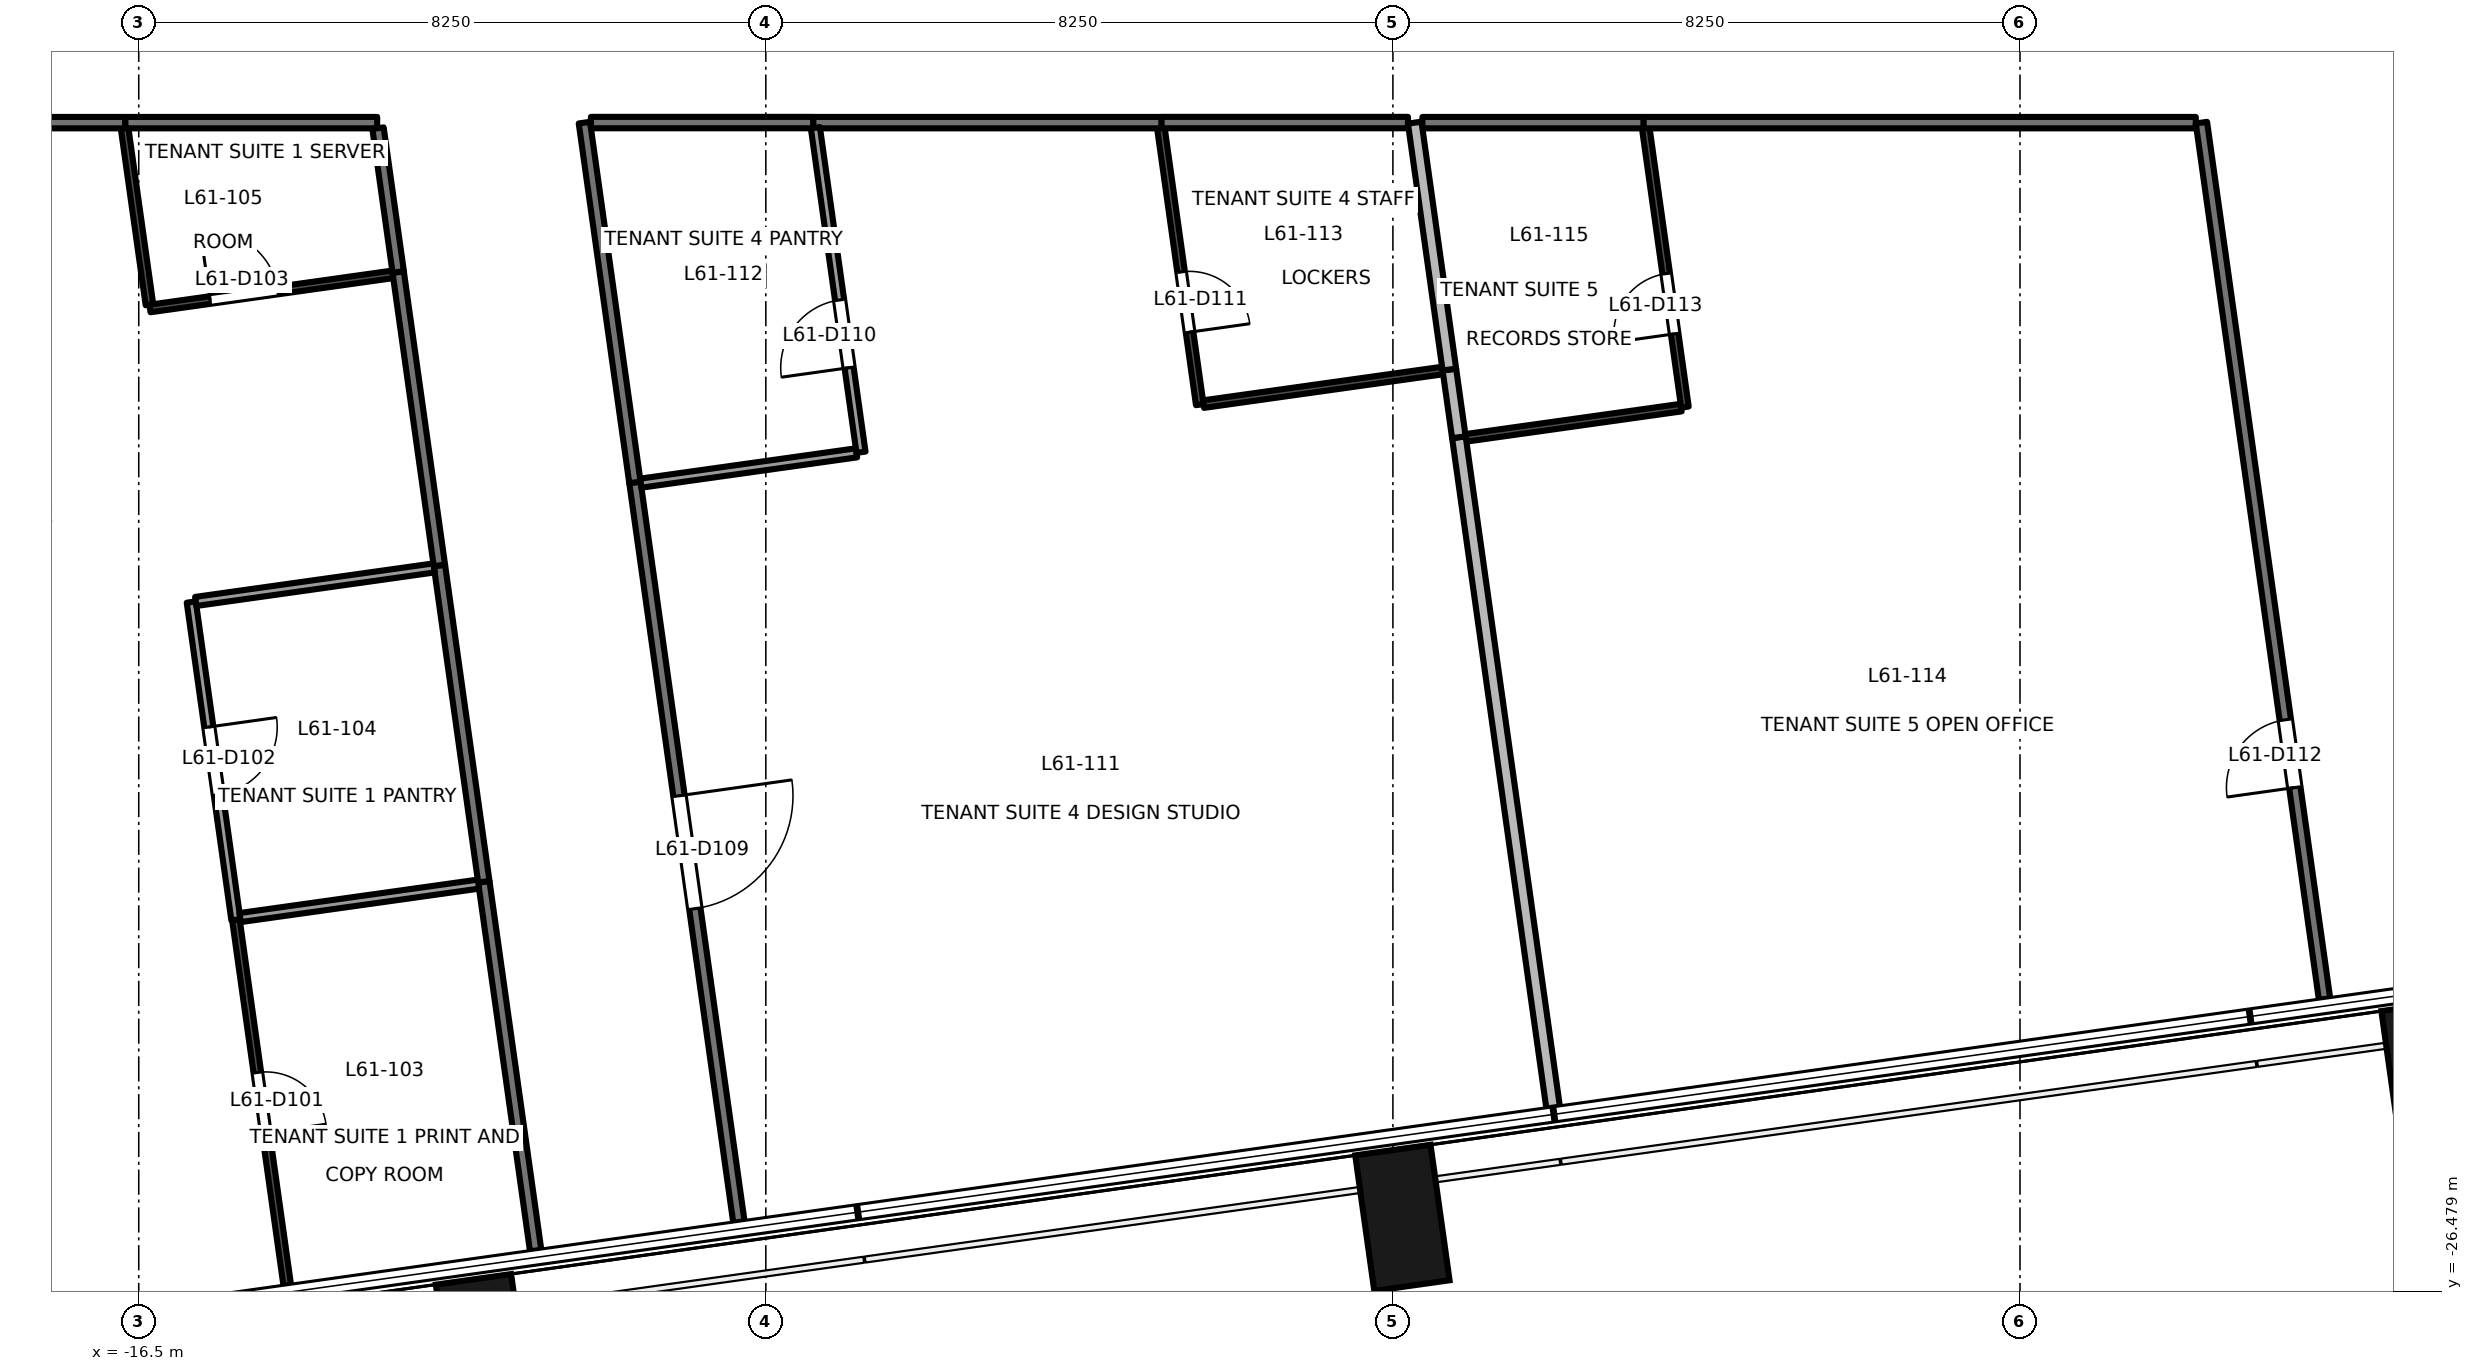
"""IFC4 building model, lengths in metres.
Left out: names, types, materials, properties, quantities, classifications, styles, units other than length and angle.
Written with IfcOpenShell. Run it as: python <this file> out.ifc"""

import sys

from ifc_helpers import new_model, si_unit, direction, frame, frame_2d, origin, origin_2d, place, context, subcontext, project, spatial, rectangle, extrude, element, fill, save


model = new_model("IFC4")
c1 = context("Model", 3, precision=1e-05, world=origin(), true_north=direction((0.0, 1.0)))
c2 = subcontext(c1, "Body", "Model", "MODEL_VIEW")
j1 = project(units=[si_unit("LENGTHUNIT", "METRE"), si_unit("PLANEANGLEUNIT", "RADIAN")], contexts=[c1])
p1 = place(None, origin())
s1 = spatial("IfcSite", under=j1, at=p1, CompositionType="ELEMENT")
p2 = place(p1, origin())
s2 = spatial("IfcBuilding", under=s1, at=p2, CompositionType="ELEMENT")
p3 = place(p2, frame((0.0, 0.0, 266.8)))
s3 = spatial("IfcBuildingStorey", under=s2, at=p3, CompositionType="ELEMENT", Elevation=266.8)
for number, where, z_axis, x_axis in (
    (1, (-11.971, -27.209, -0.2), (0.0, 0.0, 1.0), (0.99, 0.139, 0.0)),
    (2, (0.125, -25.508, -0.2), (0.0, 0.0, 1.0), (0.99, 0.139, 0.0)),
    (3, (13.625, -23.61, -0.2), (0.0, 0.0, 1.0), (0.99, 0.139, 0.0)),
):
    element("IfcColumn", number, at=place(p3, frame(where, z_axis=z_axis, x_axis=x_axis)), inside=s3, PredefinedType="COLUMN", context=c2, shape_type="SweptSolid", body=[
        extrude(rectangle(XDim=1.0, YDim=1.8, at=origin_2d()), origin(), (0.0, 0.0, 1.0), 3.9),
    ])
p4 = place(p3, frame((-16.676, -11.1, 0.0), z_axis=(0.0, 0.0, 1.0), x_axis=(-1.0, 0.0, 0.0)))
e4 = element("IfcWall", 4, at=p4, inside=s3, PredefinedType="PARTITIONING", context=c2, shape_type="SweptSolid", body=[
    extrude(rectangle(XDim=4.024, YDim=0.15, at=frame_2d((2.012, 0.0))), origin(), (0.0, 0.0, 1.0), 3.7),
])
p5 = place(p4, frame((1.562, 0.0, 0.0)))
e5 = element("IfcOpeningElement", 5, at=p5, cuts=e4, PredefinedType="OPENING", context=c2, shape_type="SweptSolid", body=[
    extrude(rectangle(XDim=0.9, YDim=2.1, at=frame_2d((0.45, 1.05))), frame((0.0, 0.085, 0.0), z_axis=(0.0, -1.0, 0.0), x_axis=(1.0, 0.0, 0.0)), (0.0, 0.0, 1.0), 0.171),
])
p6 = place(p3, frame((-12.544, -16.928, 0.0), z_axis=(0.0, 0.0, 1.0), x_axis=(-0.139221261089, 0.990261299083, 0.0)))
e6 = element("IfcWall", 6, at=p6, inside=s3, PredefinedType="PARTITIONING", context=c2, shape_type="SweptSolid", body=[
    extrude(rectangle(XDim=3.9, YDim=0.15, at=frame_2d((1.95, 0.0))), origin(), (0.0, 0.0, 1.0), 3.7),
])
p7 = place(p3, frame((-11.278, -25.939, 0.0), z_axis=(0.0, 0.0, 1.0), x_axis=(-0.139167797017, 0.990268814148, 0.0)))
e7 = element("IfcWall", 7, at=p7, inside=s3, PredefinedType="PARTITIONING", context=c2, shape_type="SweptSolid", body=[
    extrude(rectangle(XDim=4.9, YDim=0.15, at=frame_2d((2.45, 0.0))), origin(), (0.0, 0.0, 1.0), 3.7),
])
p8 = place(p3, frame((-11.96, -21.087, 0.0), z_axis=(0.0, 0.0, 1.0), x_axis=(-0.139052638616, 0.990284991148, 0.0)))
e8 = element("IfcWall", 8, at=p8, inside=s3, PredefinedType="PARTITIONING", context=c2, shape_type="SweptSolid", body=[
    extrude(rectangle(XDim=4.2, YDim=0.15, at=frame_2d((2.1, 0.0))), origin(), (0.0, 0.0, 1.0), 3.7),
])
p9 = place(p3, frame((-13.363, -11.1, 0.0), z_axis=(0.0, 0.0, 1.0), x_axis=(-1.0, 0.0, 0.0)))
e9 = element("IfcWall", 9, at=p9, inside=s3, PredefinedType="PARTITIONING", context=c2, shape_type="SweptSolid", body=[
    extrude(rectangle(XDim=3.313, YDim=0.15, at=frame_2d((1.656, 0.0))), origin(), (0.0, 0.0, 1.0), 2.8),
])
p10 = place(p3, frame((-13.086, -13.065, 0.0), z_axis=(0.0, 0.0, 1.0), x_axis=(-0.139292033523, 0.990251346577, 0.0)))
e10 = element("IfcWall", 10, at=p10, inside=s3, PredefinedType="PARTITIONING", context=c2, shape_type="SweptSolid", body=[
    extrude(rectangle(XDim=1.91, YDim=0.15, at=frame_2d((0.955, 0.0))), origin(), (0.0, 0.0, 1.0), 2.8),
])
p11 = place(p3, frame((-9.972, -15.833, 0.0), z_axis=(0.0, 0.0, 1.0), x_axis=(0.139205343882, -0.990263536759, 0.0)))
e11 = element("IfcWall", 11, at=p11, inside=s3, PredefinedType="PARTITIONING", context=c2, shape_type="SweptSolid", body=[
    extrude(rectangle(XDim=9.827, YDim=0.15, at=frame_2d((4.913, 0.0))), origin(), (0.0, 0.0, 1.0), 2.8),
])
p12 = place(p11, frame((4.163, 0.0, 0.0)))
e12 = element("IfcOpeningElement", 12, at=p12, cuts=e11, PredefinedType="OPENING", context=c2, shape_type="SweptSolid", body=[
    extrude(rectangle(XDim=1.5, YDim=2.1, at=frame_2d((0.75, 1.05))), frame((0.0, 0.085, 0.0), z_axis=(0.0, -1.0, 0.0), x_axis=(1.0, 0.0, 0.0)), (0.0, 0.0, 1.0), 0.171),
])
p13 = place(p3, frame((-3.043, -11.1, 0.0), z_axis=(0.0, 0.0, 1.0), x_axis=(-1.0, 0.0, 0.0)))
e13 = element("IfcWall", 13, at=p13, inside=s3, PredefinedType="PARTITIONING", context=c2, shape_type="SweptSolid", body=[
    extrude(rectangle(XDim=4.584, YDim=0.15, at=frame_2d((2.292, 0.0))), origin(), (0.0, 0.0, 1.0), 2.8),
])
p14 = place(p3, frame((-10.637, -11.1, 0.0), z_axis=(0.0, 0.0, 1.0), x_axis=(0.139146821365, -0.990271761742, 0.0)))
e14 = element("IfcWall", 14, at=p14, inside=s3, PredefinedType="PARTITIONING", context=c2, shape_type="SweptSolid", body=[
    extrude(rectangle(XDim=4.779, YDim=0.15, at=frame_2d((2.39, 0.0))), origin(), (0.0, 0.0, 1.0), 3.7),
])
p15 = place(p3, frame((-7.627, -11.099, 0.0), z_axis=(0.0, 0.0, 1.0), x_axis=(-1.0, 0.0, 0.0)))
e15 = element("IfcWall", 15, at=p15, inside=s3, PredefinedType="PARTITIONING", context=c2, shape_type="SweptSolid", body=[
    extrude(rectangle(XDim=2.924, YDim=0.15, at=frame_2d((1.462, 0.0))), origin(), (0.0, 0.0, 1.0), 2.8),
])
p16 = place(p3, frame((0.198, -11.099, 0.0), z_axis=(0.0, 0.0, 1.0), x_axis=(-1.0, 0.0, 0.0)))
e16 = element("IfcWall", 16, at=p16, inside=s3, PredefinedType="PARTITIONING", context=c2, shape_type="SweptSolid", body=[
    extrude(rectangle(XDim=3.241, YDim=0.15, at=frame_2d((1.621, 0.0))), origin(), (0.0, 0.0, 1.0), 2.9),
])
p17 = place(p3, frame((10.563, -11.1, 0.0), z_axis=(0.0, 0.0, 1.0), x_axis=(-1.0, 0.0, 0.0)))
e17 = element("IfcWall", 17, at=p17, inside=s3, PredefinedType="PARTITIONING", context=c2, shape_type="SweptSolid", body=[
    extrude(rectangle(XDim=7.267, YDim=0.15, at=frame_2d((3.634, 0.0))), origin(), (0.0, 0.0, 1.0), 2.9),
])
p18 = place(p3, frame((12.257, -22.631, 0.0), z_axis=(0.0, 0.0, 1.0), x_axis=(-0.139134361512, 0.990273512443, 0.0)))
e18 = element("IfcWall", 18, at=p18, inside=s3, PredefinedType="PARTITIONING", context=c2, shape_type="SweptSolid", body=[
    extrude(rectangle(XDim=11.644, YDim=0.15, at=frame_2d((5.822, 0.0))), origin(), (0.0, 0.0, 1.0), 3.7),
])
p19 = place(p18, frame((2.811, 0.0, 0.0)))
e19 = element("IfcOpeningElement", 19, at=p19, cuts=e18, PredefinedType="OPENING", context=c2, shape_type="SweptSolid", body=[
    extrude(rectangle(XDim=0.9, YDim=2.1, at=frame_2d((0.45, 1.05))), frame((0.0, 0.085, 0.0), z_axis=(0.0, -1.0, 0.0), x_axis=(1.0, 0.0, 0.0)), (0.0, 0.0, 1.0), 0.171),
])
p20 = place(p3, frame((3.296, -11.1, 0.0), z_axis=(0.0, 0.0, 1.0), x_axis=(-1.0, 0.0, 0.0)))
e20 = element("IfcWall", 20, at=p20, inside=s3, PredefinedType="PARTITIONING", context=c2, shape_type="SweptSolid", body=[
    extrude(rectangle(XDim=2.908, YDim=0.15, at=frame_2d((1.454, 0.0))), origin(), (0.0, 0.0, 1.0), 3.7),
])
p21 = place(p3, frame((-15.222, -21.586, 0.0), z_axis=(0.0, 0.0, 1.0), x_axis=(0.139120882778, -0.990275406124, 0.0)))
e21 = element("IfcWall", 21, at=p21, inside=s3, PredefinedType="PARTITIONING", context=c2, shape_type="SweptSolid", body=[
    extrude(rectangle(XDim=4.859, YDim=0.1, at=frame_2d((2.43, 0.0))), origin(), (0.0, 0.0, 1.0), 3.7),
])
p22 = place(p21, frame((2.03, 0.0, 0.0)))
e22 = element("IfcOpeningElement", 22, at=p22, cuts=e21, PredefinedType="OPENING", context=c2, shape_type="SweptSolid", body=[
    extrude(rectangle(XDim=0.8, YDim=2.1, at=frame_2d((0.4, 1.05))), frame((0.0, 0.061, 0.0), z_axis=(0.0, -1.0, 0.0), x_axis=(1.0, 0.0, 0.0)), (0.0, 0.0, 1.0), 0.121),
])
p23 = place(p3, frame((-15.809, -17.407, 0.0), z_axis=(0.0, 0.0, 1.0), x_axis=(0.139136935655, -0.99027315077, 0.0)))
e23 = element("IfcWall", 23, at=p23, inside=s3, PredefinedType="PARTITIONING", context=c2, shape_type="SweptSolid", body=[
    extrude(rectangle(XDim=4.22, YDim=0.12, at=frame_2d((2.11, 0.0))), origin(), (0.0, 0.0, 1.0), 3.7),
])
p24 = place(p23, frame((1.66, 0.0, 0.0)))
e24 = element("IfcOpeningElement", 24, at=p24, cuts=e23, PredefinedType="OPENING", context=c2, shape_type="SweptSolid", body=[
    extrude(rectangle(XDim=0.9, YDim=2.1, at=frame_2d((0.45, 1.05))), frame((0.0, 0.071, 0.0), z_axis=(0.0, -1.0, 0.0), x_axis=(1.0, 0.0, 0.0)), (0.0, 0.0, 1.0), 0.141),
])
p25 = place(p3, frame((-12.615, -16.958, 0.0), z_axis=(0.0, 0.0, 1.0), x_axis=(-0.990254086283, -0.139272555084, 0.0)))
e25 = element("IfcWall", 25, at=p25, inside=s3, PredefinedType="PARTITIONING", context=c2, shape_type="SweptSolid", body=[
    extrude(rectangle(XDim=3.166, YDim=0.12, at=frame_2d((1.583, 0.0))), origin(), (0.0, 0.0, 1.0), 2.8),
])
p26 = place(p3, frame((-16.687, -11.168, 0.0), z_axis=(0.0, 0.0, 1.0), x_axis=(0.139560302367, -0.990213573934, 0.0)))
e26 = element("IfcWall", 26, at=p26, inside=s3, PredefinedType="PARTITIONING", context=c2, shape_type="SweptSolid", body=[
    extrude(rectangle(XDim=2.351, YDim=0.1, at=frame_2d((1.176, 0.0))), origin(), (0.0, 0.0, 1.0), 3.7),
])
p27 = place(p3, frame((-16.352, -13.545, 0.0), z_axis=(0.0, 0.0, 1.0), x_axis=(0.990264894561, 0.13919568456, 0.0)))
e27 = element("IfcWall", 27, at=p27, inside=s3, PredefinedType="PARTITIONING", context=c2, shape_type="SweptSolid", body=[
    extrude(rectangle(XDim=3.226, YDim=0.1, at=frame_2d((1.613, 0.0))), origin(), (0.0, 0.0, 1.0), 2.8),
])
p28 = place(p27, frame((0.798, 0.0, 0.0)))
e28 = element("IfcOpeningElement", 28, at=p28, cuts=e27, PredefinedType="OPENING", context=c2, shape_type="SweptSolid", body=[
    extrude(rectangle(XDim=0.9, YDim=2.1, at=frame_2d((0.45, 1.05))), frame((0.0, 0.061, 0.0), z_axis=(0.0, -1.0, 0.0), x_axis=(1.0, 0.0, 0.0)), (0.0, 0.0, 1.0), 0.121),
])
p29 = place(p3, frame((-15.166, -21.558, 0.0), z_axis=(0.0, 0.0, 1.0), x_axis=(0.990285967974, 0.139045681821, 0.0)))
e29 = element("IfcWall", 29, at=p29, inside=s3, PredefinedType="PARTITIONING", context=c2, shape_type="SweptSolid", body=[
    extrude(rectangle(XDim=3.166, YDim=0.12, at=frame_2d((1.583, 0.0))), origin(), (0.0, 0.0, 1.0), 2.8),
])
p30 = place(p3, frame((-9.895, -15.843, 0.0), z_axis=(0.0, 0.0, 1.0), x_axis=(0.990265570358, 0.139190876728, 0.0)))
e30 = element("IfcWall", 30, at=p30, inside=s3, PredefinedType="PARTITIONING", context=c2, shape_type="SweptSolid", body=[
    extrude(rectangle(XDim=2.866, YDim=0.12, at=frame_2d((1.433, 0.0))), origin(), (0.0, 0.0, 1.0), 2.8),
])
p31 = place(p3, frame((-6.998, -15.436, 0.0), z_axis=(0.0, 0.0, 1.0), x_axis=(-0.139145497857, 0.990271947712, 0.0)))
e31 = element("IfcWall", 31, at=p31, inside=s3, PredefinedType="PARTITIONING", context=c2, shape_type="SweptSolid", body=[
    extrude(rectangle(XDim=4.311, YDim=0.12, at=frame_2d((2.156, 0.0))), origin(), (0.0, 0.0, 1.0), 3.7),
])
p32 = place(p31, frame((1.123, 0.0, 0.0)))
e32 = element("IfcOpeningElement", 32, at=p32, cuts=e31, PredefinedType="OPENING", context=c2, shape_type="SweptSolid", body=[
    extrude(rectangle(XDim=0.9, YDim=2.1, at=frame_2d((0.45, 1.05))), frame((0.0, 0.071, 0.0), z_axis=(0.0, -1.0, 0.0), x_axis=(1.0, 0.0, 0.0)), (0.0, 0.0, 1.0), 0.141),
])
p33 = place(p3, frame((-3.053, -11.168, 0.0), z_axis=(0.0, 0.0, 1.0), x_axis=(0.139199908751, -0.990264300782, 0.0)))
e33 = element("IfcWall", 33, at=p33, inside=s3, PredefinedType="PARTITIONING", context=c2, shape_type="SweptSolid", body=[
    extrude(rectangle(XDim=3.678, YDim=0.1, at=frame_2d((1.839, 0.0))), origin(), (0.0, 0.0, 1.0), 3.7),
])
p34 = place(p33, frame((1.915, 0.0, 0.0)))
e34 = element("IfcOpeningElement", 34, at=p34, cuts=e33, PredefinedType="OPENING", context=c2, shape_type="SweptSolid", body=[
    extrude(rectangle(XDim=0.8, YDim=2.1, at=frame_2d((0.4, 1.05))), frame((0.0, 0.061, 0.0), z_axis=(0.0, -1.0, 0.0), x_axis=(1.0, 0.0, 0.0)), (0.0, 0.0, 1.0), 0.121),
])
p35 = place(p3, frame((-2.492, -14.803, 0.0), z_axis=(0.0, 0.0, 1.0), x_axis=(0.990278754473, 0.139097046841, 0.0)))
e35 = element("IfcWall", 35, at=p35, inside=s3, PredefinedType="PARTITIONING", context=c2, shape_type="SweptSolid", body=[
    extrude(rectangle(XDim=3.177, YDim=0.1, at=frame_2d((1.588, 0.0))), origin(), (0.0, 0.0, 1.0), 2.9),
])
p36 = place(p3, frame((0.868, -15.239, 0.0), z_axis=(0.0, 0.0, 1.0), x_axis=(0.139233409815, -0.990259591012, 0.0)))
e36 = element("IfcWall", 36, at=p36, inside=s3, PredefinedType="PARTITIONING", context=c2, shape_type="SweptSolid", body=[
    extrude(rectangle(XDim=8.906, YDim=0.18, at=frame_2d((4.453, 0.0))), origin(), (0.0, 0.0, 1.0), 3.7),
])
p37 = place(p3, frame((0.743, -14.349, 0.0), z_axis=(0.0, 0.0, 1.0), x_axis=(0.139100809785, -0.990278225913, 0.0)))
e37 = element("IfcWall", 37, at=p37, inside=s3, PredefinedType="PARTITIONING", context=c2, shape_type="SweptSolid", body=[
    extrude(rectangle(XDim=0.899, YDim=0.18, at=frame_2d((0.449, 0.0))), origin(), (0.0, 0.0, 1.0), 3.7),
])
p38 = place(p3, frame((0.287, -11.1, 0.0), z_axis=(0.0, 0.0, 1.0), x_axis=(0.13898222456, -0.990294875911, 0.0)))
e38 = element("IfcWall", 38, at=p38, inside=s3, PredefinedType="PARTITIONING", context=c2, shape_type="SweptSolid", body=[
    extrude(rectangle(XDim=3.28, YDim=0.18, at=frame_2d((1.64, 0.0))), origin(), (0.0, 0.0, 1.0), 3.7),
])
p39 = place(p3, frame((0.96, -15.247, 0.0), z_axis=(0.0, 0.0, 1.0), x_axis=(0.990271288443, 0.139150189669, 0.0)))
e39 = element("IfcWall", 39, at=p39, inside=s3, PredefinedType="PARTITIONING", context=c2, shape_type="SweptSolid", body=[
    extrude(rectangle(XDim=2.86, YDim=0.1, at=frame_2d((1.43, 0.0))), origin(), (0.0, 0.0, 1.0), 3.7),
])
p40 = place(p3, frame((3.842, -14.842, 0.0), z_axis=(0.0, 0.0, 1.0), x_axis=(-0.139108634852, 0.990277126722, 0.0)))
e40 = element("IfcWall", 40, at=p40, inside=s3, PredefinedType="PARTITIONING", context=c2, shape_type="SweptSolid", body=[
    extrude(rectangle(XDim=3.71, YDim=0.1, at=frame_2d((1.855, 0.0))), origin(), (0.0, 0.0, 1.0), 3.7),
])
p41 = place(p40, frame((0.973, 0.0, 0.0)))
e41 = element("IfcOpeningElement", 41, at=p41, cuts=e40, PredefinedType="OPENING", context=c2, shape_type="SweptSolid", body=[
    extrude(rectangle(XDim=0.8, YDim=2.1, at=frame_2d((0.4, 1.05))), frame((0.0, 0.061, 0.0), z_axis=(0.0, -1.0, 0.0), x_axis=(1.0, 0.0, 0.0)), (0.0, 0.0, 1.0), 0.121),
])
p42 = place(p22, origin())
e42 = element("IfcDoor", 42, at=p42, inside=s3, OperationType="SINGLE_SWING_RIGHT", PredefinedType="DOOR", context=c2, shape_type="SweptSolid", body=[
    extrude(rectangle(XDim=0.8, YDim=2.1, at=frame_2d((0.4, 1.05))), frame((0.0, 0.025, 0.0), z_axis=(0.0, -1.0, 0.0), x_axis=(1.0, 0.0, 0.0)), (0.0, 0.0, 1.0), 0.05),
])
fill(e22, e42)
p43 = place(p24, origin())
e43 = element("IfcDoor", 43, at=p43, inside=s3, OperationType="SINGLE_SWING_LEFT", PredefinedType="DOOR", context=c2, shape_type="SweptSolid", body=[
    extrude(rectangle(XDim=0.9, YDim=2.1, at=frame_2d((0.45, 1.05))), frame((0.0, 0.025, 0.0), z_axis=(0.0, -1.0, 0.0), x_axis=(1.0, 0.0, 0.0)), (0.0, 0.0, 1.0), 0.05),
])
fill(e24, e43)
p44 = place(p28, origin())
e44 = element("IfcDoor", 44, at=p44, inside=s3, OperationType="SINGLE_SWING_LEFT", PredefinedType="DOOR", context=c2, shape_type="SweptSolid", body=[
    extrude(rectangle(XDim=0.9, YDim=2.1, at=frame_2d((0.45, 1.05))), frame((0.0, 0.025, 0.0), z_axis=(0.0, -1.0, 0.0), x_axis=(1.0, 0.0, 0.0)), (0.0, 0.0, 1.0), 0.05),
])
fill(e28, e44)
p45 = place(p12, origin())
e45 = element("IfcDoor", 45, at=p45, inside=s3, OperationType="DOUBLE_DOOR_SINGLE_SWING", PredefinedType="DOOR", context=c2, shape_type="SweptSolid", body=[
    extrude(rectangle(XDim=1.5, YDim=2.1, at=frame_2d((0.75, 1.05))), frame((0.0, 0.025, 0.0), z_axis=(0.0, -1.0, 0.0), x_axis=(1.0, 0.0, 0.0)), (0.0, 0.0, 1.0), 0.05),
])
fill(e12, e45)
p46 = place(p32, origin())
e46 = element("IfcDoor", 46, at=p46, inside=s3, OperationType="SINGLE_SWING_LEFT", PredefinedType="DOOR", context=c2, shape_type="SweptSolid", body=[
    extrude(rectangle(XDim=0.9, YDim=2.1, at=frame_2d((0.45, 1.05))), frame((0.0, 0.025, 0.0), z_axis=(0.0, -1.0, 0.0), x_axis=(1.0, 0.0, 0.0)), (0.0, 0.0, 1.0), 0.05),
])
fill(e32, e46)
p47 = place(p34, origin())
e47 = element("IfcDoor", 47, at=p47, inside=s3, OperationType="SINGLE_SWING_RIGHT", PredefinedType="DOOR", context=c2, shape_type="SweptSolid", body=[
    extrude(rectangle(XDim=0.8, YDim=2.1, at=frame_2d((0.4, 1.05))), frame((0.0, 0.025, 0.0), z_axis=(0.0, -1.0, 0.0), x_axis=(1.0, 0.0, 0.0)), (0.0, 0.0, 1.0), 0.05),
])
fill(e34, e47)
p48 = place(p19, origin())
e48 = element("IfcDoor", 48, at=p48, inside=s3, OperationType="SINGLE_SWING_LEFT", PredefinedType="DOOR", context=c2, shape_type="SweptSolid", body=[
    extrude(rectangle(XDim=0.9, YDim=2.1, at=frame_2d((0.45, 1.05))), frame((0.0, 0.025, 0.0), z_axis=(0.0, -1.0, 0.0), x_axis=(1.0, 0.0, 0.0)), (0.0, 0.0, 1.0), 0.05),
])
fill(e19, e48)
p49 = place(p41, origin())
e49 = element("IfcDoor", 49, at=p49, inside=s3, OperationType="SINGLE_SWING_LEFT", PredefinedType="DOOR", context=c2, shape_type="SweptSolid", body=[
    extrude(rectangle(XDim=0.8, YDim=2.1, at=frame_2d((0.4, 1.05))), frame((0.0, 0.025, 0.0), z_axis=(0.0, -1.0, 0.0), x_axis=(1.0, 0.0, 0.0)), (0.0, 0.0, 1.0), 0.05),
])
fill(e41, e49)
save(model, sys.argv[1])
